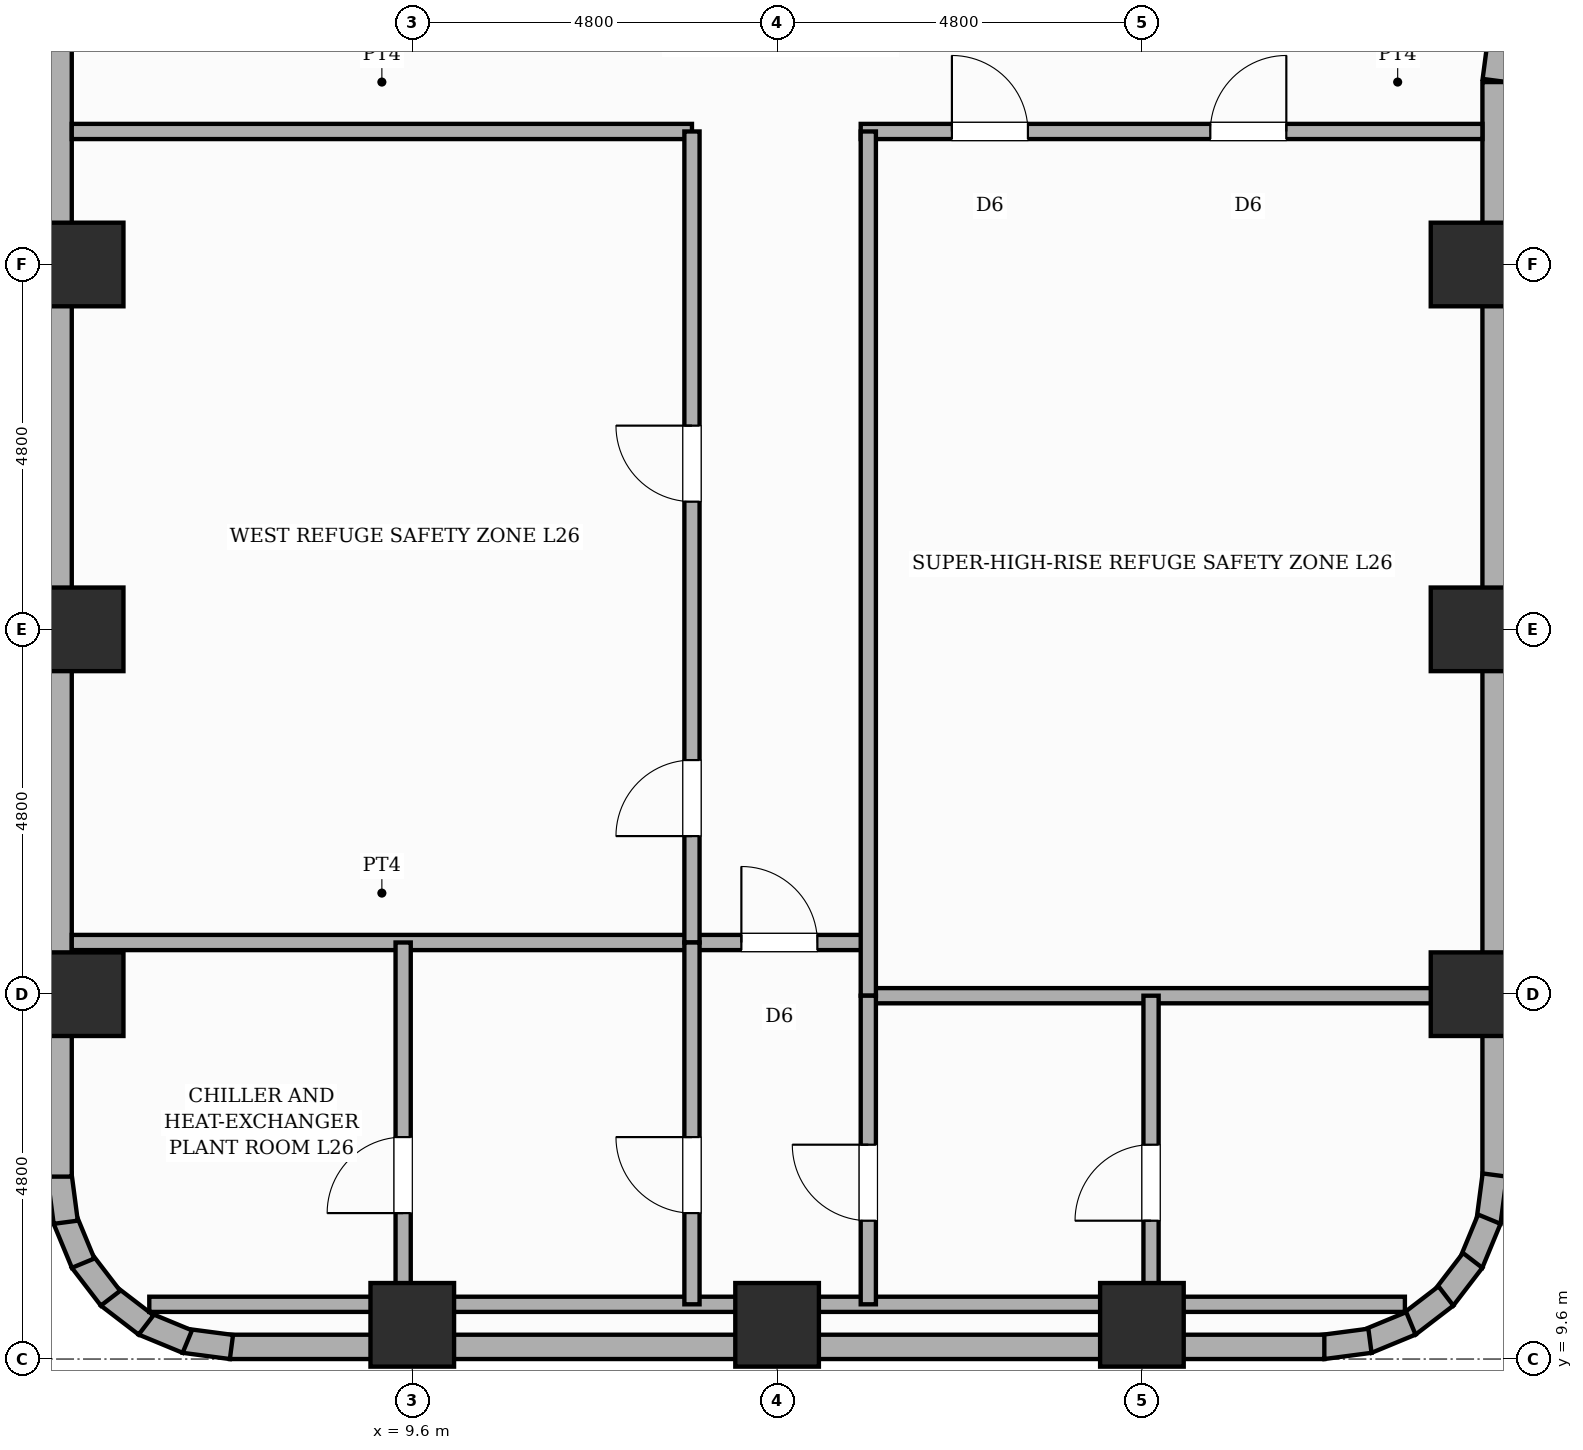
"""IFC4 building model, lengths in metres.
Left out: names, types, materials, properties, quantities, classifications, styles, units other than length and angle.
Written with IfcOpenShell. Run it as: python <this file> out.ifc"""

import sys

from ifc_helpers import new_model, si_unit, direction, frame, frame_2d, origin, origin_2d, place, context, subcontext, project, spatial, rectangle, extrude, element, fill, save


model = new_model("IFC4")
c1 = context("Model", 3, precision=1e-05, world=origin(), true_north=direction((0.0, 1.0)))
c2 = subcontext(c1, "Body", "Model", "MODEL_VIEW")
j1 = project(units=[si_unit("LENGTHUNIT", "METRE"), si_unit("PLANEANGLEUNIT", "RADIAN")], contexts=[c1])
p1 = place(None, origin())
s1 = spatial("IfcSite", under=j1, at=p1, CompositionType="ELEMENT")
p2 = place(p1, origin())
s2 = spatial("IfcBuilding", under=s1, at=p2, CompositionType="ELEMENT")
p3 = place(p2, frame((0.0, 0.0, 101.8)))
s3 = spatial("IfcBuildingStorey", under=s2, at=p3, CompositionType="ELEMENT", Elevation=101.8)
for number, where, z_axis, x_axis in (
    (1, (5.25, 14.4, 0.0), (0.0, 0.0, 1.0), (1.0, 0.0, 0.0)),
    (2, (5.25, 19.2, 0.0), (0.0, 0.0, 1.0), (1.0, 0.0, 0.0)),
    (3, (5.25, 24.0, 0.0), (0.0, 0.0, 1.0), (1.0, 0.0, 0.0)),
    (4, (9.6, 10.05, 0.0), (0.0, 0.0, 1.0), (1.0, 0.0, 0.0)),
    (5, (14.4, 10.05, 0.0), (0.0, 0.0, 1.0), (1.0, 0.0, 0.0)),
    (6, (19.2, 10.05, 0.0), (0.0, 0.0, 1.0), (1.0, 0.0, 0.0)),
    (7, (23.55, 14.4, 0.0), (0.0, 0.0, 1.0), (1.0, 0.0, 0.0)),
    (8, (23.55, 19.2, 0.0), (0.0, 0.0, 1.0), (1.0, 0.0, 0.0)),
    (9, (23.55, 24.0, 0.0), (0.0, 0.0, 1.0), (1.0, 0.0, 0.0)),
):
    element("IfcColumn", number, at=place(p3, frame(where, z_axis=z_axis, x_axis=x_axis)), inside=s3, PredefinedType="COLUMN", context=c2, shape_type="SweptSolid", body=[
        extrude(rectangle(XDim=1.1, YDim=1.1, at=origin_2d()), origin(), (0.0, 0.0, 1.0), 5.4),
    ])
p4 = place(p3, frame((23.923, 27.042, 0.0), z_axis=(0.0, 0.0, 1.0), x_axis=(-0.130555323746, -0.9914410257, 0.0)))
e10 = element("IfcWall", 10, at=p4, inside=s3, PredefinedType="STANDARD", context=c2, shape_type="SweptSolid", body=[
    extrude(rectangle(XDim=0.626, YDim=0.32, at=frame_2d((0.313, 0.0))), origin(), (0.0, 0.0, 1.0), 4.34),
])
p5 = place(p3, frame((23.84, 26.4, 0.0), z_axis=(0.0, 0.0, 1.0), x_axis=(0.0, -1.0, 0.0)))
e11 = element("IfcWall", 11, at=p5, inside=s3, PredefinedType="STANDARD", context=c2, shape_type="SweptSolid", body=[
    extrude(rectangle(XDim=14.4, YDim=0.32, at=frame_2d((7.2, 0.0))), origin(), (0.0, 0.0, 1.0), 4.34),
])
p6 = place(p3, frame((23.841, 12.021, 0.0), z_axis=(0.0, 0.0, 1.0), x_axis=(-0.130504898859, -0.991447664465, 0.0)))
e12 = element("IfcWall", 12, at=p6, inside=s3, PredefinedType="STANDARD", context=c2, shape_type="SweptSolid", body=[
    extrude(rectangle(XDim=0.627, YDim=0.32, at=frame_2d((0.313, 0.0))), origin(), (0.0, 0.0, 1.0), 5.16),
])
for number, where, z_axis, x_axis in (
    (13, (23.771, 11.44, 0.0), (0.0, 0.0, 1.0), (-0.383, -0.924, 0.0)),
    (14, (23.552, 10.897, 0.0), (0.0, 0.0, 1.0), (-0.609, -0.793, 0.0)),
    (15, (23.2, 10.43, 0.0), (0.0, 0.0, 1.0), (-0.793, -0.609, 0.0)),
    (16, (22.739, 10.069, 0.0), (0.0, 0.0, 1.0), (-0.924, -0.383, 0.0)),
    (17, (22.2, 9.84, 0.0), (0.0, 0.0, 1.0), (-0.991, -0.131, 0.0)),
):
    element("IfcWall", number, at=place(p3, frame(where, z_axis=z_axis, x_axis=x_axis)), inside=s3, PredefinedType="STANDARD", context=c2, shape_type="SweptSolid", body=[
        extrude(rectangle(XDim=0.626, YDim=0.32, at=frame_2d((0.313, 0.0))), origin(), (0.0, 0.0, 1.0), 5.16),
    ])
p7 = place(p3, frame((21.6, 9.76, 0.0), z_axis=(0.0, 0.0, 1.0), x_axis=(-1.0, 0.0, 0.0)))
e18 = element("IfcWall", 18, at=p7, inside=s3, PredefinedType="STANDARD", context=c2, shape_type="SweptSolid", body=[
    extrude(rectangle(XDim=14.4, YDim=0.32, at=frame_2d((7.2, 0.0))), origin(), (0.0, 0.0, 1.0), 4.34),
])
p8 = place(p3, frame((7.221, 9.759, 0.0), z_axis=(0.0, 0.0, 1.0), x_axis=(-0.991447664465, 0.130504898859, 0.0)))
e19 = element("IfcWall", 19, at=p8, inside=s3, PredefinedType="STANDARD", context=c2, shape_type="SweptSolid", body=[
    extrude(rectangle(XDim=0.627, YDim=0.32, at=frame_2d((0.313, 0.0))), origin(), (0.0, 0.0, 1.0), 5.16),
])
p9 = place(p3, frame((6.64, 9.83, 0.0), z_axis=(0.0, 0.0, 1.0), x_axis=(-0.923836271867, 0.382787856107, 0.0)))
e20 = element("IfcWall", 20, at=p9, inside=s3, PredefinedType="STANDARD", context=c2, shape_type="SweptSolid", body=[
    extrude(rectangle(XDim=0.626, YDim=0.32, at=frame_2d((0.313, 0.0))), origin(), (0.0, 0.0, 1.0), 5.16),
])
p10 = place(p3, frame((6.097, 10.048, 0.0), z_axis=(0.0, 0.0, 1.0), x_axis=(-0.793405610854, 0.608693302629, 0.0)))
e21 = element("IfcWall", 21, at=p10, inside=s3, PredefinedType="STANDARD", context=c2, shape_type="SweptSolid", body=[
    extrude(rectangle(XDim=0.626, YDim=0.32, at=frame_2d((0.313, 0.0))), origin(), (0.0, 0.0, 1.0), 5.16),
])
p11 = place(p3, frame((5.63, 10.4, 0.0), z_axis=(0.0, 0.0, 1.0), x_axis=(-0.608938521285, 0.7932174212, 0.0)))
e22 = element("IfcWall", 22, at=p11, inside=s3, PredefinedType="STANDARD", context=c2, shape_type="SweptSolid", body=[
    extrude(rectangle(XDim=0.627, YDim=0.32, at=frame_2d((0.313, 0.0))), origin(), (0.0, 0.0, 1.0), 5.16),
])
p12 = place(p3, frame((5.269, 10.861, 0.0), z_axis=(0.0, 0.0, 1.0), x_axis=(-0.382650053678, 0.92389335771, 0.0)))
e23 = element("IfcWall", 23, at=p12, inside=s3, PredefinedType="STANDARD", context=c2, shape_type="SweptSolid", body=[
    extrude(rectangle(XDim=0.626, YDim=0.32, at=frame_2d((0.313, 0.0))), origin(), (0.0, 0.0, 1.0), 5.16),
])
p13 = place(p3, frame((5.04, 11.4, 0.0), z_axis=(0.0, 0.0, 1.0), x_axis=(-0.130504898859, 0.991447664465, 0.0)))
e24 = element("IfcWall", 24, at=p13, inside=s3, PredefinedType="STANDARD", context=c2, shape_type="SweptSolid", body=[
    extrude(rectangle(XDim=0.627, YDim=0.32, at=frame_2d((0.313, 0.0))), origin(), (0.0, 0.0, 1.0), 5.16),
])
p14 = place(p3, frame((4.96, 12.0, 0.0), z_axis=(0.0, 0.0, 1.0), x_axis=(0.0, 1.0, 0.0)))
e25 = element("IfcWall", 25, at=p14, inside=s3, PredefinedType="STANDARD", context=c2, shape_type="SweptSolid", body=[
    extrude(rectangle(XDim=33.6, YDim=0.32, at=frame_2d((16.8, 0.0))), origin(), (0.0, 0.0, 1.0), 4.34),
])
p15 = place(p3, frame((13.28, 15.08, 0.0), z_axis=(0.0, 0.0, 1.0), x_axis=(1.0, 0.0, 0.0)))
e26 = element("IfcWall", 26, at=p15, inside=s3, PredefinedType="PARTITIONING", context=c2, shape_type="SweptSolid", body=[
    extrude(rectangle(XDim=2.32, YDim=0.2, at=frame_2d((1.16, 0.0))), origin(), (0.0, 0.0, 1.0), 5.16),
])
p16 = place(p15, frame((0.65, 0.0, 0.0)))
e27 = element("IfcOpeningElement", 27, at=p16, cuts=e26, PredefinedType="OPENING", context=c2, shape_type="SweptSolid", body=[
    extrude(rectangle(XDim=1.0, YDim=2.15, at=frame_2d((0.5, 1.075))), frame((0.0, 0.11, 0.0), z_axis=(0.0, -1.0, 0.0), x_axis=(1.0, 0.0, 0.0)), (0.0, 0.0, 1.0), 0.22),
])
p17 = place(p3, frame((15.5, 25.75, 0.0), z_axis=(0.0, 0.0, 1.0), x_axis=(1.0, 0.0, 0.0)))
e28 = element("IfcWall", 28, at=p17, inside=s3, PredefinedType="PARTITIONING", context=c2, shape_type="SweptSolid", body=[
    extrude(rectangle(XDim=8.18, YDim=0.2, at=frame_2d((4.09, 0.0))), origin(), (0.0, 0.0, 1.0), 5.16),
])
p18 = place(p17, frame((1.2, 0.0, 0.0)))
e29 = element("IfcOpeningElement", 29, at=p18, cuts=e28, PredefinedType="OPENING", context=c2, shape_type="SweptSolid", body=[
    extrude(rectangle(XDim=1.0, YDim=2.15, at=frame_2d((0.5, 1.075))), frame((0.0, 0.11, 0.0), z_axis=(0.0, -1.0, 0.0), x_axis=(1.0, 0.0, 0.0)), (0.0, 0.0, 1.0), 0.22),
])
p19 = place(p17, frame((4.6, 0.0, 0.0)))
e30 = element("IfcOpeningElement", 30, at=p19, cuts=e28, PredefinedType="OPENING", context=c2, shape_type="SweptSolid", body=[
    extrude(rectangle(XDim=1.0, YDim=2.15, at=frame_2d((0.5, 1.075))), frame((0.0, 0.11, 0.0), z_axis=(0.0, -1.0, 0.0), x_axis=(1.0, 0.0, 0.0)), (0.0, 0.0, 1.0), 0.22),
])
p20 = place(p3, frame((15.6, 14.38, 0.0), z_axis=(0.0, 0.0, 1.0), x_axis=(1.0, 0.0, 0.0)))
e31 = element("IfcWall", 31, at=p20, inside=s3, PredefinedType="PARTITIONING", context=c2, shape_type="SweptSolid", body=[
    extrude(rectangle(XDim=8.08, YDim=0.2, at=frame_2d((4.04, 0.0))), origin(), (0.0, 0.0, 1.0), 4.34),
])
for number, where, z_axis, x_axis in (
    (32, (5.12, 25.75, 0.0), (0.0, 0.0, 1.0), (1.0, 0.0, 0.0)),
    (33, (5.12, 15.08, 0.0), (0.0, 0.0, 1.0), (1.0, 0.0, 0.0)),
):
    element("IfcWall", number, at=place(p3, frame(where, z_axis=z_axis, x_axis=x_axis)), inside=s3, PredefinedType="PARTITIONING", context=c2, shape_type="SweptSolid", body=[
        extrude(rectangle(XDim=8.16, YDim=0.2, at=frame_2d((4.08, 0.0))), origin(), (0.0, 0.0, 1.0), 5.16),
    ])
p21 = place(p3, frame((13.28, 15.08, 0.0), z_axis=(0.0, 0.0, 1.0), x_axis=(0.0, 1.0, 0.0)))
e34 = element("IfcWall", 34, at=p21, inside=s3, PredefinedType="PARTITIONING", context=c2, shape_type="SweptSolid", body=[
    extrude(rectangle(XDim=10.67, YDim=0.2, at=frame_2d((5.335, 0.0))), origin(), (0.0, 0.0, 1.0), 5.16),
])
p22 = place(p21, frame((1.4, 0.0, 0.0)))
e35 = element("IfcOpeningElement", 35, at=p22, cuts=e34, PredefinedType="OPENING", context=c2, shape_type="SweptSolid", body=[
    extrude(rectangle(XDim=1.0, YDim=2.15, at=frame_2d((0.5, 1.075))), frame((0.0, 0.11, 0.0), z_axis=(0.0, -1.0, 0.0), x_axis=(1.0, 0.0, 0.0)), (0.0, 0.0, 1.0), 0.22),
])
p23 = place(p21, frame((5.8, 0.0, 0.0)))
e36 = element("IfcOpeningElement", 36, at=p23, cuts=e34, PredefinedType="OPENING", context=c2, shape_type="SweptSolid", body=[
    extrude(rectangle(XDim=1.0, YDim=2.15, at=frame_2d((0.5, 1.075))), frame((0.0, 0.11, 0.0), z_axis=(0.0, -1.0, 0.0), x_axis=(1.0, 0.0, 0.0)), (0.0, 0.0, 1.0), 0.22),
])
p24 = place(p3, frame((15.6, 14.38, 0.0), z_axis=(0.0, 0.0, 1.0), x_axis=(0.0, 1.0, 0.0)))
e37 = element("IfcWall", 37, at=p24, inside=s3, PredefinedType="PARTITIONING", context=c2, shape_type="SweptSolid", body=[
    extrude(rectangle(XDim=11.37, YDim=0.2, at=frame_2d((5.685, 0.0))), origin(), (0.0, 0.0, 1.0), 5.16),
])
p25 = place(p3, frame((6.14, 10.32, 0.0), z_axis=(0.0, 0.0, 1.0), x_axis=(1.0, 0.0, 0.0)))
e38 = element("IfcWall", 38, at=p25, inside=s3, PredefinedType="PARTITIONING", context=c2, shape_type="SweptSolid", body=[
    extrude(rectangle(XDim=16.52, YDim=0.2, at=frame_2d((8.26, 0.0))), origin(), (0.0, 0.0, 1.0), 4.34),
])
p26 = place(p3, frame((13.28, 10.32, 0.0), z_axis=(0.0, 0.0, 1.0), x_axis=(0.0, 1.0, 0.0)))
e39 = element("IfcWall", 39, at=p26, inside=s3, PredefinedType="PARTITIONING", context=c2, shape_type="SweptSolid", body=[
    extrude(rectangle(XDim=4.76, YDim=0.2, at=frame_2d((2.38, 0.0))), origin(), (0.0, 0.0, 1.0), 5.16),
])
p27 = place(p26, frame((1.2, 0.0, 0.0)))
e40 = element("IfcOpeningElement", 40, at=p27, cuts=e39, PredefinedType="OPENING", context=c2, shape_type="SweptSolid", body=[
    extrude(rectangle(XDim=1.0, YDim=2.15, at=frame_2d((0.5, 1.075))), frame((0.0, 0.11, 0.0), z_axis=(0.0, -1.0, 0.0), x_axis=(1.0, 0.0, 0.0)), (0.0, 0.0, 1.0), 0.22),
])
p28 = place(p3, frame((15.6, 10.32, 0.0), z_axis=(0.0, 0.0, 1.0), x_axis=(0.0, 1.0, 0.0)))
e41 = element("IfcWall", 41, at=p28, inside=s3, PredefinedType="PARTITIONING", context=c2, shape_type="SweptSolid", body=[
    extrude(rectangle(XDim=4.06, YDim=0.2, at=frame_2d((2.03, 0.0))), origin(), (0.0, 0.0, 1.0), 5.16),
])
p29 = place(p28, frame((1.1, 0.0, 0.0)))
e42 = element("IfcOpeningElement", 42, at=p29, cuts=e41, PredefinedType="OPENING", context=c2, shape_type="SweptSolid", body=[
    extrude(rectangle(XDim=1.0, YDim=2.15, at=frame_2d((0.5, 1.075))), frame((0.0, 0.11, 0.0), z_axis=(0.0, -1.0, 0.0), x_axis=(1.0, 0.0, 0.0)), (0.0, 0.0, 1.0), 0.22),
])
p30 = place(p3, frame((9.48, 10.32, 0.0), z_axis=(0.0, 0.0, 1.0), x_axis=(0.0, 1.0, 0.0)))
e43 = element("IfcWall", 43, at=p30, inside=s3, PredefinedType="PARTITIONING", context=c2, shape_type="SweptSolid", body=[
    extrude(rectangle(XDim=4.76, YDim=0.2, at=frame_2d((2.38, 0.0))), origin(), (0.0, 0.0, 1.0), 5.16),
])
p31 = place(p30, frame((1.2, 0.0, 0.0)))
e44 = element("IfcOpeningElement", 44, at=p31, cuts=e43, PredefinedType="OPENING", context=c2, shape_type="SweptSolid", body=[
    extrude(rectangle(XDim=1.0, YDim=2.15, at=frame_2d((0.5, 1.075))), frame((0.0, 0.11, 0.0), z_axis=(0.0, -1.0, 0.0), x_axis=(1.0, 0.0, 0.0)), (0.0, 0.0, 1.0), 0.22),
])
p32 = place(p3, frame((19.32, 10.32, 0.0), z_axis=(0.0, 0.0, 1.0), x_axis=(0.0, 1.0, 0.0)))
e45 = element("IfcWall", 45, at=p32, inside=s3, PredefinedType="PARTITIONING", context=c2, shape_type="SweptSolid", body=[
    extrude(rectangle(XDim=4.06, YDim=0.2, at=frame_2d((2.03, 0.0))), origin(), (0.0, 0.0, 1.0), 5.16),
])
p33 = place(p32, frame((1.1, 0.0, 0.0)))
e46 = element("IfcOpeningElement", 46, at=p33, cuts=e45, PredefinedType="OPENING", context=c2, shape_type="SweptSolid", body=[
    extrude(rectangle(XDim=1.0, YDim=2.15, at=frame_2d((0.5, 1.075))), frame((0.0, 0.11, 0.0), z_axis=(0.0, -1.0, 0.0), x_axis=(1.0, 0.0, 0.0)), (0.0, 0.0, 1.0), 0.22),
])
p34 = place(p16, origin())
e47 = element("IfcDoor", 47, at=p34, inside=s3, OperationType="SINGLE_SWING_LEFT", PredefinedType="DOOR", context=c2, shape_type="SweptSolid", body=[
    extrude(rectangle(XDim=1.0, YDim=2.15, at=frame_2d((0.5, 1.075))), frame((0.0, 0.025, 0.0), z_axis=(0.0, -1.0, 0.0), x_axis=(1.0, 0.0, 0.0)), (0.0, 0.0, 1.0), 0.05),
])
fill(e27, e47)
p35 = place(p18, origin())
e48 = element("IfcDoor", 48, at=p35, inside=s3, OperationType="SINGLE_SWING_LEFT", PredefinedType="DOOR", context=c2, shape_type="SweptSolid", body=[
    extrude(rectangle(XDim=1.0, YDim=2.15, at=frame_2d((0.5, 1.075))), frame((0.0, 0.025, 0.0), z_axis=(0.0, -1.0, 0.0), x_axis=(1.0, 0.0, 0.0)), (0.0, 0.0, 1.0), 0.05),
])
fill(e29, e48)
p36 = place(p19, origin())
e49 = element("IfcDoor", 49, at=p36, inside=s3, OperationType="SINGLE_SWING_RIGHT", PredefinedType="DOOR", context=c2, shape_type="SweptSolid", body=[
    extrude(rectangle(XDim=1.0, YDim=2.15, at=frame_2d((0.5, 1.075))), frame((0.0, 0.025, 0.0), z_axis=(0.0, -1.0, 0.0), x_axis=(1.0, 0.0, 0.0)), (0.0, 0.0, 1.0), 0.05),
])
fill(e30, e49)
p37 = place(p22, origin())
e50 = element("IfcDoor", 50, at=p37, inside=s3, OperationType="SINGLE_SWING_LEFT", PredefinedType="DOOR", context=c2, shape_type="SweptSolid", body=[
    extrude(rectangle(XDim=1.0, YDim=2.15, at=frame_2d((0.5, 1.075))), frame((0.0, 0.025, 0.0), z_axis=(0.0, -1.0, 0.0), x_axis=(1.0, 0.0, 0.0)), (0.0, 0.0, 1.0), 0.05),
])
fill(e35, e50)
p38 = place(p23, origin())
e51 = element("IfcDoor", 51, at=p38, inside=s3, OperationType="SINGLE_SWING_RIGHT", PredefinedType="DOOR", context=c2, shape_type="SweptSolid", body=[
    extrude(rectangle(XDim=1.0, YDim=2.15, at=frame_2d((0.5, 1.075))), frame((0.0, 0.025, 0.0), z_axis=(0.0, -1.0, 0.0), x_axis=(1.0, 0.0, 0.0)), (0.0, 0.0, 1.0), 0.05),
])
fill(e36, e51)
p39 = place(p27, origin())
e52 = element("IfcDoor", 52, at=p39, inside=s3, OperationType="SINGLE_SWING_RIGHT", PredefinedType="DOOR", context=c2, shape_type="SweptSolid", body=[
    extrude(rectangle(XDim=1.0, YDim=2.15, at=frame_2d((0.5, 1.075))), frame((0.0, 0.025, 0.0), z_axis=(0.0, -1.0, 0.0), x_axis=(1.0, 0.0, 0.0)), (0.0, 0.0, 1.0), 0.05),
])
fill(e40, e52)
p40 = place(p31, origin())
e53 = element("IfcDoor", 53, at=p40, inside=s3, OperationType="SINGLE_SWING_LEFT", PredefinedType="DOOR", context=c2, shape_type="SweptSolid", body=[
    extrude(rectangle(XDim=1.0, YDim=2.15, at=frame_2d((0.5, 1.075))), frame((0.0, 0.025, 0.0), z_axis=(0.0, -1.0, 0.0), x_axis=(1.0, 0.0, 0.0)), (0.0, 0.0, 1.0), 0.05),
])
fill(e44, e53)
p41 = place(p29, origin())
e54 = element("IfcDoor", 54, at=p41, inside=s3, OperationType="SINGLE_SWING_RIGHT", PredefinedType="DOOR", context=c2, shape_type="SweptSolid", body=[
    extrude(rectangle(XDim=1.0, YDim=2.15, at=frame_2d((0.5, 1.075))), frame((0.0, 0.025, 0.0), z_axis=(0.0, -1.0, 0.0), x_axis=(1.0, 0.0, 0.0)), (0.0, 0.0, 1.0), 0.05),
])
fill(e42, e54)
p42 = place(p33, origin())
e55 = element("IfcDoor", 55, at=p42, inside=s3, OperationType="SINGLE_SWING_LEFT", PredefinedType="DOOR", context=c2, shape_type="SweptSolid", body=[
    extrude(rectangle(XDim=1.0, YDim=2.15, at=frame_2d((0.5, 1.075))), frame((0.0, 0.025, 0.0), z_axis=(0.0, -1.0, 0.0), x_axis=(1.0, 0.0, 0.0)), (0.0, 0.0, 1.0), 0.05),
])
fill(e46, e55)
save(model, sys.argv[1])
